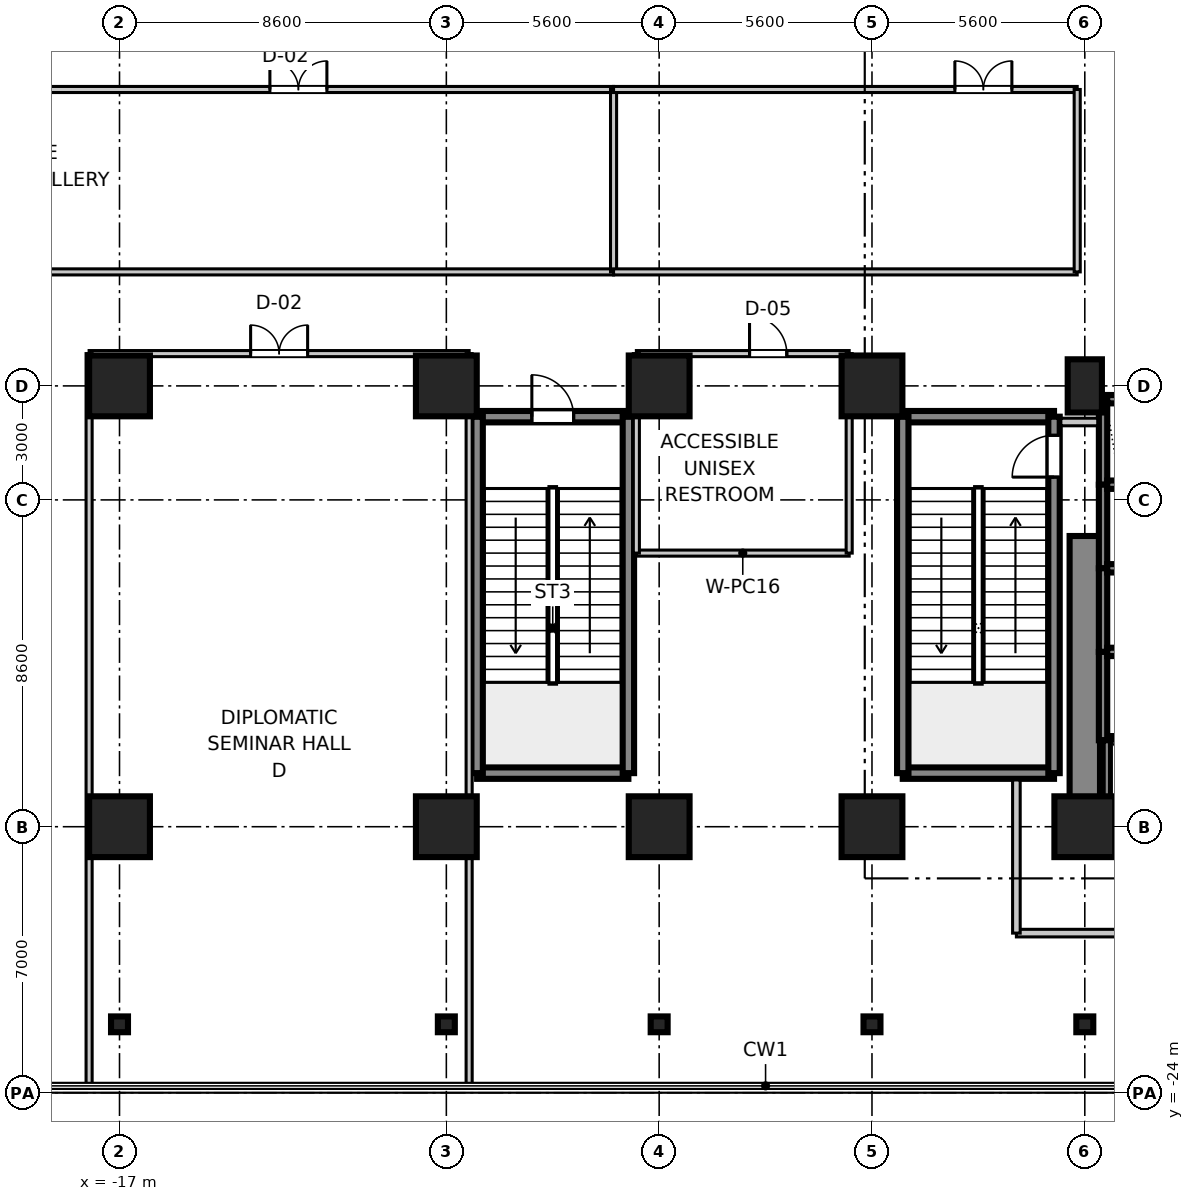
"""IFC4 building model, lengths in metres.
Left out: names, types, materials, properties, quantities, classifications, styles, units other than length and angle.
Written with IfcOpenShell. Run it as: python <this file> out.ifc"""

import sys

from ifc_helpers import new_model, si_unit, direction, frame, frame_2d, origin, origin_2d, place, context, subcontext, project, spatial, rectangle, i_section, extrude, source, transform, mapped, element, fill, save


model = new_model("IFC4")
c1 = context("Model", 3, precision=1e-05, world=origin(), true_north=direction((0.0, 1.0)))
c2 = subcontext(c1, "Body", "Model", "MODEL_VIEW")
j1 = project(units=[si_unit("LENGTHUNIT", "METRE"), si_unit("PLANEANGLEUNIT", "RADIAN")], contexts=[c1])
p1 = place(None, origin())
s1 = spatial("IfcSite", under=j1, at=p1, CompositionType="ELEMENT")
p2 = place(p1, origin())
s2 = spatial("IfcBuilding", under=s1, at=p2, CompositionType="ELEMENT")
p3 = place(p2, frame((0.0, 0.0, 10.8)))
s3 = spatial("IfcBuildingStorey", under=s2, at=p3, CompositionType="ELEMENT", Elevation=10.8)
m1 = source(origin(), c2, "Body", "SweptSolid", [
    extrude(rectangle(XDim=1.6, YDim=1.6, at=origin_2d()), origin(), (0.0, 0.0, 1.0), 5.355),
])
for number, where, z_axis, x_axis in (
    (1, (-17.0, -17.0, 0.0), (0.0, 0.0, 1.0), (1.0, 0.0, 0.0)),
    (2, (-17.0, -5.4, 0.0), (0.0, 0.0, 1.0), (1.0, 0.0, 0.0)),
    (3, (-8.4, -17.0, 0.0), (0.0, 0.0, 1.0), (1.0, 0.0, 0.0)),
    (4, (-8.4, -5.4, 0.0), (0.0, 0.0, 1.0), (1.0, 0.0, 0.0)),
    (5, (-2.8, -17.0, 0.0), (0.0, 0.0, 1.0), (1.0, 0.0, 0.0)),
    (6, (-2.8, -5.4, 0.0), (0.0, 0.0, 1.0), (1.0, 0.0, 0.0)),
    (7, (2.8, -17.0, 0.0), (0.0, 0.0, 1.0), (1.0, 0.0, 0.0)),
    (8, (2.8, -5.4, 0.0), (0.0, 0.0, 1.0), (1.0, 0.0, 0.0)),
    (9, (8.4, -17.0, 0.0), (0.0, 0.0, 1.0), (1.0, 0.0, 0.0)),
):
    element("IfcColumn", number, at=place(p3, frame(where, z_axis=z_axis, x_axis=x_axis)), inside=s3, PredefinedType="COLUMN", context=c2, shape_type="MappedRepresentation", body=[
        mapped(m1, transform((0.0, 0.0, 0.0), scale=1.0)),
    ])
m2 = source(origin(), c2, "Body", "SweptSolid", [
    extrude(rectangle(XDim=0.9, YDim=1.4, at=origin_2d()), origin(), (0.0, 0.0, 1.0), 5.355),
])
p4 = place(p3, frame((8.4, -5.4, 0.0), z_axis=(0.0, 0.0, 1.0), x_axis=(1.0, 0.0, 0.0)))
e10 = element("IfcColumn", 10, at=p4, inside=s3, PredefinedType="PILASTER", context=c2, shape_type="MappedRepresentation", body=[
    mapped(m2, transform((0.0, 0.0, 0.0), scale=1.0)),
])
m3 = source(origin(), c2, "Body", "SweptSolid", [
    extrude(i_section(OverallWidth=0.416, OverallDepth=0.446, WebThickness=0.025, FlangeThickness=0.04, at=origin_2d()), origin(), (0.0, 0.0, 1.0), 5.355),
])
for number, where, z_axis, x_axis in (
    (11, (-17.0, -22.2, 0.0), (0.0, 0.0, 1.0), (0.0, 1.0, 0.0)),
    (12, (-8.4, -22.2, 0.0), (0.0, 0.0, 1.0), (0.0, 1.0, 0.0)),
    (13, (-2.8, -22.2, 0.0), (0.0, 0.0, 1.0), (0.0, 1.0, 0.0)),
    (14, (2.8, -22.2, 0.0), (0.0, 0.0, 1.0), (0.0, 1.0, 0.0)),
    (15, (8.4, -22.2, 0.0), (0.0, 0.0, 1.0), (0.0, 1.0, 0.0)),
):
    element("IfcColumn", number, at=place(p3, frame(where, z_axis=z_axis, x_axis=x_axis)), inside=s3, PredefinedType="COLUMN", context=c2, shape_type="MappedRepresentation", body=[
        mapped(m3, transform((0.0, 0.0, 0.0), scale=1.0)),
    ])
m4 = source(origin(), c2, "Body", "SweptSolid", [
    extrude(rectangle(XDim=7.65, YDim=0.8, at=frame_2d((3.825, 0.0))), origin(), (0.0, 0.0, 1.0), 5.06),
])
p5 = place(p3, frame((8.4, -17.0, 0.0), z_axis=(0.0, 0.0, 1.0), x_axis=(0.0, 1.0, 0.0)))
e16 = element("IfcWall", 16, at=p5, inside=s3, PredefinedType="SHEAR", context=c2, shape_type="MappedRepresentation", body=[
    mapped(m4, transform((0.0, 0.0, 0.0), scale=1.0)),
])
m5 = source(origin(), c2, "Body", "SweptSolid", [
    extrude(rectangle(XDim=3.98, YDim=0.3, at=frame_2d((1.99, 0.0))), origin(), (0.0, 0.0, 1.0), 5.06),
])
for number, where, z_axis, x_axis in (
    (17, (3.61, -15.59, 0.0), (0.0, 0.0, 1.0), (1.0, 0.0, 0.0)),
    (18, (3.61, -6.21, 0.0), (0.0, 0.0, 1.0), (1.0, 0.0, 0.0)),
):
    element("IfcWall", number, at=place(p3, frame(where, z_axis=z_axis, x_axis=x_axis)), inside=s3, PredefinedType="SHEAR", context=c2, shape_type="MappedRepresentation", body=[
        mapped(m5, transform((0.0, 0.0, 0.0), scale=1.0)),
    ])
m6 = source(origin(), c2, "Body", "SweptSolid", [
    extrude(rectangle(XDim=9.38, YDim=0.3, at=frame_2d((4.69, 0.0))), origin(), (0.0, 0.0, 1.0), 5.06),
])
p6 = place(p3, frame((3.61, -15.59, 0.0), z_axis=(0.0, 0.0, 1.0), x_axis=(0.0, 1.0, 0.0)))
e19 = element("IfcWall", 19, at=p6, inside=s3, PredefinedType="SHEAR", context=c2, shape_type="MappedRepresentation", body=[
    mapped(m6, transform((0.0, 0.0, 0.0), scale=1.0)),
])
p7 = place(p3, frame((7.59, -15.59, 0.0), z_axis=(0.0, 0.0, 1.0), x_axis=(0.0, 1.0, 0.0)))
e20 = element("IfcWall", 20, at=p7, inside=s3, PredefinedType="SHEAR", context=c2, shape_type="MappedRepresentation", body=[
    mapped(m6, transform((0.0, 0.0, 0.0), scale=1.0)),
])
p8 = place(p7, frame((7.79, 0.0, 0.0)))
e21 = element("IfcOpeningElement", 21, at=p8, cuts=e20, PredefinedType="OPENING", context=c2, shape_type="SweptSolid", body=[
    extrude(rectangle(XDim=1.1, YDim=2.15, at=frame_2d((0.55, 1.075))), frame((0.0, 0.16, 0.0), z_axis=(0.0, -1.0, 0.0), x_axis=(1.0, 0.0, 0.0)), (0.0, 0.0, 1.0), 0.32),
])
p9 = place(p3, frame((-7.59, -15.59, 0.0), z_axis=(0.0, 0.0, 1.0), x_axis=(1.0, 0.0, 0.0)))
e22 = element("IfcWall", 22, at=p9, inside=s3, PredefinedType="SHEAR", context=c2, shape_type="MappedRepresentation", body=[
    mapped(m5, transform((0.0, 0.0, 0.0), scale=1.0)),
])
p10 = place(p3, frame((-7.59, -6.21, 0.0), z_axis=(0.0, 0.0, 1.0), x_axis=(1.0, 0.0, 0.0)))
e23 = element("IfcWall", 23, at=p10, inside=s3, PredefinedType="SHEAR", context=c2, shape_type="MappedRepresentation", body=[
    mapped(m5, transform((0.0, 0.0, 0.0), scale=1.0)),
])
p11 = place(p10, frame((1.44, 0.0, 0.0)))
e24 = element("IfcOpeningElement", 24, at=p11, cuts=e23, PredefinedType="OPENING", context=c2, shape_type="SweptSolid", body=[
    extrude(rectangle(XDim=1.1, YDim=2.15, at=frame_2d((0.55, 1.075))), frame((0.0, 0.16, 0.0), z_axis=(0.0, -1.0, 0.0), x_axis=(1.0, 0.0, 0.0)), (0.0, 0.0, 1.0), 0.32),
])
for number, where, z_axis, x_axis in (
    (25, (-7.59, -15.59, 0.0), (0.0, 0.0, 1.0), (0.0, 1.0, 0.0)),
    (26, (-3.61, -15.59, 0.0), (0.0, 0.0, 1.0), (0.0, 1.0, 0.0)),
):
    element("IfcWall", number, at=place(p3, frame(where, z_axis=z_axis, x_axis=x_axis)), inside=s3, PredefinedType="SHEAR", context=c2, shape_type="MappedRepresentation", body=[
        mapped(m6, transform((0.0, 0.0, 0.0), scale=1.0)),
    ])
m7 = source(origin(), c2, "Body", "SweptSolid", [
    extrude(rectangle(XDim=2.36, YDim=0.22, at=frame_2d((1.18, 0.0))), origin(), (0.0, 0.0, 1.0), 5.06),
])
p12 = place(p3, frame((8.88, -8.0, 0.0), z_axis=(0.0, 0.0, 1.0), x_axis=(0.0, 1.0, 0.0)))
e27 = element("IfcWall", 27, at=p12, inside=s3, PredefinedType="SHEAR", context=c2, shape_type="MappedRepresentation", body=[
    mapped(m7, transform((0.0, 0.0, 0.0), scale=1.0)),
])
m8 = source(origin(), c2, "Body", "SweptSolid", [
    extrude(rectangle(XDim=1.82, YDim=0.22, at=frame_2d((0.91, 0.0))), origin(), (0.0, 0.0, 1.0), 5.06),
])
p13 = place(p3, frame((8.99, -5.75, 0.0), z_axis=(0.0, 0.0, 1.0), x_axis=(1.0, 0.0, 0.0)))
e28 = element("IfcWall", 28, at=p13, inside=s3, PredefinedType="SHEAR", context=c2, shape_type="MappedRepresentation", body=[
    mapped(m8, transform((0.0, 0.0, 0.0), scale=1.0)),
])
m9 = source(origin(), c2, "Body", "SweptSolid", [
    extrude(rectangle(XDim=2.2, YDim=0.22, at=frame_2d((1.1, 0.0))), origin(), (0.0, 0.0, 1.0), 5.06),
])
p14 = place(p3, frame((8.88, -10.2, 0.0), z_axis=(0.0, 0.0, 1.0), x_axis=(0.0, 1.0, 0.0)))
e29 = element("IfcWall", 29, at=p14, inside=s3, PredefinedType="SHEAR", context=c2, shape_type="MappedRepresentation", body=[
    mapped(m9, transform((0.0, 0.0, 0.0), scale=1.0)),
])
m10 = source(origin(), c2, "Body", "SweptSolid", [
    extrude(rectangle(XDim=1.82, YDim=0.22, at=frame_2d((0.91, 0.0))), origin(), (0.0, 0.0, 1.0), 5.4),
])
p15 = place(p3, frame((8.99, -8.0, 0.0), z_axis=(0.0, 0.0, 1.0), x_axis=(1.0, 0.0, 0.0)))
e30 = element("IfcWall", 30, at=p15, inside=s3, PredefinedType="SHEAR", context=c2, shape_type="MappedRepresentation", body=[
    mapped(m10, transform((0.0, 0.0, 0.0), scale=1.0)),
])
p16 = place(p3, frame((8.88, -12.4, 0.0), z_axis=(0.0, 0.0, 1.0), x_axis=(0.0, 1.0, 0.0)))
e31 = element("IfcWall", 31, at=p16, inside=s3, PredefinedType="SHEAR", context=c2, shape_type="MappedRepresentation", body=[
    mapped(m9, transform((0.0, 0.0, 0.0), scale=1.0)),
])
p17 = place(p3, frame((8.99, -10.2, 0.0), z_axis=(0.0, 0.0, 1.0), x_axis=(1.0, 0.0, 0.0)))
e32 = element("IfcWall", 32, at=p17, inside=s3, PredefinedType="SHEAR", context=c2, shape_type="MappedRepresentation", body=[
    mapped(m10, transform((0.0, 0.0, 0.0), scale=1.0)),
])
m11 = source(origin(), c2, "Body", "SweptSolid", [
    extrude(rectangle(XDim=2.325, YDim=0.22, at=frame_2d((1.163, 0.0))), origin(), (0.0, 0.0, 1.0), 5.06),
])
p18 = place(p3, frame((8.88, -14.725, 0.0), z_axis=(0.0, 0.0, 1.0), x_axis=(0.0, 1.0, 0.0)))
e33 = element("IfcWall", 33, at=p18, inside=s3, PredefinedType="SHEAR", context=c2, shape_type="MappedRepresentation", body=[
    mapped(m11, transform((0.0, 0.0, 0.0), scale=1.0)),
])
p19 = place(p3, frame((8.99, -12.4, 0.0), z_axis=(0.0, 0.0, 1.0), x_axis=(1.0, 0.0, 0.0)))
e34 = element("IfcWall", 34, at=p19, inside=s3, PredefinedType="SHEAR", context=c2, shape_type="MappedRepresentation", body=[
    mapped(m10, transform((0.0, 0.0, 0.0), scale=1.0)),
])
m12 = source(origin(), c2, "Body", "SweptSolid", [
    extrude(rectangle(XDim=2.635, YDim=0.22, at=frame_2d((1.317, 0.0))), origin(), (0.0, 0.0, 1.0), 5.06),
])
p20 = place(p3, frame((8.98, -17.36, 0.0), z_axis=(0.0, 0.0, 1.0), x_axis=(0.0, 1.0, 0.0)))
e35 = element("IfcWall", 35, at=p20, inside=s3, PredefinedType="SHEAR", context=c2, shape_type="MappedRepresentation", body=[
    mapped(m12, transform((0.0, 0.0, 0.0), scale=1.0)),
])
m13 = source(origin(), c2, "Body", "SweptSolid", [
    extrude(rectangle(XDim=1.62, YDim=0.22, at=frame_2d((0.81, 0.0))), origin(), (0.0, 0.0, 1.0), 5.06),
])
p21 = place(p3, frame((9.09, -17.25, 0.0), z_axis=(0.0, 0.0, 1.0), x_axis=(1.0, 0.0, 0.0)))
e36 = element("IfcWall", 36, at=p21, inside=s3, PredefinedType="SHEAR", context=c2, shape_type="MappedRepresentation", body=[
    mapped(m13, transform((0.0, 0.0, 0.0), scale=1.0)),
])
m14 = source(origin(), c2, "Body", "SweptSolid", [
    extrude(rectangle(XDim=1.62, YDim=0.22, at=frame_2d((0.81, 0.0))), origin(), (0.0, 0.0, 1.0), 5.4),
])
p22 = place(p3, frame((9.09, -14.725, 0.0), z_axis=(0.0, 0.0, 1.0), x_axis=(1.0, 0.0, 0.0)))
e37 = element("IfcWall", 37, at=p22, inside=s3, PredefinedType="SHEAR", context=c2, shape_type="MappedRepresentation", body=[
    mapped(m14, transform((0.0, 0.0, 0.0), scale=1.0)),
])
m15 = source(origin(), c2, "Body", "SweptSolid", [
    extrude(rectangle(XDim=5.82, YDim=0.2, at=frame_2d((2.91, 0.0))), origin(), (0.0, 0.0, 1.0), 3.4),
])
p23 = place(p3, frame((6.6, -19.8, 0.0), z_axis=(0.0, 0.0, 1.0), x_axis=(1.0, 0.0, 0.0)))
e38 = element("IfcWall", 38, at=p23, inside=s3, PredefinedType="PARTITIONING", context=c2, shape_type="MappedRepresentation", body=[
    mapped(m15, transform((0.0, 0.0, 0.0), scale=1.0)),
])
m16 = source(origin(), c2, "Body", "SweptSolid", [
    extrude(rectangle(XDim=4.03, YDim=0.2, at=frame_2d((2.015, 0.0))), origin(), (0.0, 0.0, 1.0), 3.4),
])
p24 = place(p3, frame((6.6, -19.8, 0.0), z_axis=(0.0, 0.0, 1.0), x_axis=(0.0, 1.0, 0.0)))
e39 = element("IfcWall", 39, at=p24, inside=s3, PredefinedType="PARTITIONING", context=c2, shape_type="MappedRepresentation", body=[
    mapped(m16, transform((0.0, 0.0, 0.0), scale=1.0)),
])
m17 = source(origin(), c2, "Body", "SweptSolid", [
    extrude(rectangle(XDim=0.97, YDim=0.2, at=frame_2d((0.485, 0.0))), origin(), (0.0, 0.0, 1.0), 3.4),
])
p25 = place(p3, frame((7.77, -6.35, 0.0), z_axis=(0.0, 0.0, 1.0), x_axis=(1.0, 0.0, 0.0)))
e40 = element("IfcWall", 40, at=p25, inside=s3, PredefinedType="PARTITIONING", context=c2, shape_type="MappedRepresentation", body=[
    mapped(m17, transform((0.0, 0.0, 0.0), scale=1.0)),
])
m18 = source(origin(), c2, "Body", "SweptSolid", [
    extrude(rectangle(XDim=10.0, YDim=0.16, at=frame_2d((5.0, 0.0))), origin(), (0.0, 0.0, 1.0), 3.4),
])
p26 = place(p3, frame((-17.8, -4.55, 0.0), z_axis=(0.0, 0.0, 1.0), x_axis=(1.0, 0.0, 0.0)))
e41 = element("IfcWall", 41, at=p26, inside=s3, PredefinedType="PARTITIONING", context=c2, shape_type="MappedRepresentation", body=[
    mapped(m18, transform((0.0, 0.0, 0.0), scale=1.0)),
])
p27 = place(p26, frame((4.25, 0.0, 0.0)))
e42 = element("IfcOpeningElement", 42, at=p27, cuts=e41, PredefinedType="OPENING", context=c2, shape_type="SweptSolid", body=[
    extrude(rectangle(XDim=1.5, YDim=2.15, at=frame_2d((0.75, 1.075))), frame((0.0, 0.09, 0.0), z_axis=(0.0, -1.0, 0.0), x_axis=(1.0, 0.0, 0.0)), (0.0, 0.0, 1.0), 0.18),
])
m19 = source(origin(), c2, "Body", "SweptSolid", [
    extrude(rectangle(XDim=19.21, YDim=0.16, at=frame_2d((9.605, 0.0))), origin(), (0.0, 0.0, 1.0), 3.4),
])
for number, where, z_axis, x_axis in (
    (43, (-17.8, -23.76, 0.0), (0.0, 0.0, 1.0), (0.0, 1.0, 0.0)),
    (44, (-7.8, -23.76, 0.0), (0.0, 0.0, 1.0), (0.0, 1.0, 0.0)),
):
    element("IfcWall", number, at=place(p3, frame(where, z_axis=z_axis, x_axis=x_axis)), inside=s3, PredefinedType="PARTITIONING", context=c2, shape_type="MappedRepresentation", body=[
        mapped(m19, transform((0.0, 0.0, 0.0), scale=1.0)),
    ])
m20 = source(origin(), c2, "Body", "SweptSolid", [
    extrude(rectangle(XDim=32.76, YDim=0.16, at=frame_2d((16.38, 0.0))), origin(), (0.0, 0.0, 1.0), 3.4),
])
p28 = place(p3, frame((-36.76, -2.4, 0.0), z_axis=(0.0, 0.0, 1.0), x_axis=(1.0, 0.0, 0.0)))
e45 = element("IfcWall", 45, at=p28, inside=s3, PredefinedType="PARTITIONING", context=c2, shape_type="MappedRepresentation", body=[
    mapped(m20, transform((0.0, 0.0, 0.0), scale=1.0)),
])
p29 = place(p3, frame((-36.76, 2.4, 0.0), z_axis=(0.0, 0.0, 1.0), x_axis=(1.0, 0.0, 0.0)))
e46 = element("IfcWall", 46, at=p29, inside=s3, PredefinedType="PARTITIONING", context=c2, shape_type="MappedRepresentation", body=[
    mapped(m20, transform((0.0, 0.0, 0.0), scale=1.0)),
])
p30 = place(p29, frame((23.717, 0.0, 0.0)))
e47 = element("IfcOpeningElement", 47, at=p30, cuts=e46, PredefinedType="OPENING", context=c2, shape_type="SweptSolid", body=[
    extrude(rectangle(XDim=1.5, YDim=2.15, at=frame_2d((0.75, 1.075))), frame((0.0, 0.09, 0.0), z_axis=(0.0, -1.0, 0.0), x_axis=(1.0, 0.0, 0.0)), (0.0, 0.0, 1.0), 0.18),
])
m21 = source(origin(), c2, "Body", "SweptSolid", [
    extrude(rectangle(XDim=4.8, YDim=0.16, at=frame_2d((2.4, 0.0))), origin(), (0.0, 0.0, 1.0), 3.4),
])
p31 = place(p3, frame((-4.0, -2.4, 0.0), z_axis=(0.0, 0.0, 1.0), x_axis=(0.0, 1.0, 0.0)))
e48 = element("IfcWall", 48, at=p31, inside=s3, PredefinedType="PARTITIONING", context=c2, shape_type="MappedRepresentation", body=[
    mapped(m21, transform((0.0, 0.0, 0.0), scale=1.0)),
])
m22 = source(origin(), c2, "Body", "SweptSolid", [
    extrude(rectangle(XDim=12.2, YDim=0.16, at=frame_2d((6.1, 0.0))), origin(), (0.0, 0.0, 1.0), 3.4),
])
p32 = place(p3, frame((-4.0, -2.4, 0.0), z_axis=(0.0, 0.0, 1.0), x_axis=(1.0, 0.0, 0.0)))
e49 = element("IfcWall", 49, at=p32, inside=s3, PredefinedType="PARTITIONING", context=c2, shape_type="MappedRepresentation", body=[
    mapped(m22, transform((0.0, 0.0, 0.0), scale=1.0)),
])
p33 = place(p3, frame((-4.0, 2.4, 0.0), z_axis=(0.0, 0.0, 1.0), x_axis=(1.0, 0.0, 0.0)))
e50 = element("IfcWall", 50, at=p33, inside=s3, PredefinedType="PARTITIONING", context=c2, shape_type="MappedRepresentation", body=[
    mapped(m22, transform((0.0, 0.0, 0.0), scale=1.0)),
])
p34 = place(p33, frame((8.981, 0.0, 0.0)))
e51 = element("IfcOpeningElement", 51, at=p34, cuts=e50, PredefinedType="OPENING", context=c2, shape_type="SweptSolid", body=[
    extrude(rectangle(XDim=1.5, YDim=2.15, at=frame_2d((0.75, 1.075))), frame((0.0, 0.09, 0.0), z_axis=(0.0, -1.0, 0.0), x_axis=(1.0, 0.0, 0.0)), (0.0, 0.0, 1.0), 0.18),
])
p35 = place(p3, frame((8.2, -2.4, 0.0), z_axis=(0.0, 0.0, 1.0), x_axis=(0.0, 1.0, 0.0)))
e52 = element("IfcWall", 52, at=p35, inside=s3, PredefinedType="PARTITIONING", context=c2, shape_type="MappedRepresentation", body=[
    mapped(m21, transform((0.0, 0.0, 0.0), scale=1.0)),
])
m23 = source(origin(), c2, "Body", "SweptSolid", [
    extrude(rectangle(XDim=5.6, YDim=0.16, at=frame_2d((2.8, 0.0))), origin(), (0.0, 0.0, 1.0), 3.4),
])
p36 = place(p3, frame((-3.4, -9.8, 0.0), z_axis=(0.0, 0.0, 1.0), x_axis=(1.0, 0.0, 0.0)))
e53 = element("IfcWall", 53, at=p36, inside=s3, PredefinedType="PARTITIONING", context=c2, shape_type="MappedRepresentation", body=[
    mapped(m23, transform((0.0, 0.0, 0.0), scale=1.0)),
])
p37 = place(p3, frame((-3.4, -4.55, 0.0), z_axis=(0.0, 0.0, 1.0), x_axis=(1.0, 0.0, 0.0)))
e54 = element("IfcWall", 54, at=p37, inside=s3, PredefinedType="PARTITIONING", context=c2, shape_type="MappedRepresentation", body=[
    mapped(m23, transform((0.0, 0.0, 0.0), scale=1.0)),
])
p38 = place(p37, frame((2.978, 0.0, 0.0)))
e55 = element("IfcOpeningElement", 55, at=p38, cuts=e54, PredefinedType="OPENING", context=c2, shape_type="SweptSolid", body=[
    extrude(rectangle(XDim=0.98, YDim=2.1, at=frame_2d((0.49, 1.05))), frame((0.0, 0.09, 0.0), z_axis=(0.0, -1.0, 0.0), x_axis=(1.0, 0.0, 0.0)), (0.0, 0.0, 1.0), 0.18),
])
m24 = source(origin(), c2, "Body", "SweptSolid", [
    extrude(rectangle(XDim=5.25, YDim=0.16, at=frame_2d((2.625, 0.0))), origin(), (0.0, 0.0, 1.0), 3.4),
])
for number, where, z_axis, x_axis in (
    (56, (-3.4, -9.8, 0.0), (0.0, 0.0, 1.0), (0.0, 1.0, 0.0)),
    (57, (2.2, -9.8, 0.0), (0.0, 0.0, 1.0), (0.0, 1.0, 0.0)),
):
    element("IfcWall", number, at=place(p3, frame(where, z_axis=z_axis, x_axis=x_axis)), inside=s3, PredefinedType="PARTITIONING", context=c2, shape_type="MappedRepresentation", body=[
        mapped(m24, transform((0.0, 0.0, 0.0), scale=1.0)),
    ])
m25 = source(origin(), c2, "Body", "SweptSolid", [
    extrude(rectangle(XDim=1.1, YDim=2.15, at=frame_2d((0.55, 1.075))), frame((0.0, 0.025, 0.0), z_axis=(0.0, -1.0, 0.0), x_axis=(1.0, 0.0, 0.0)), (0.0, 0.0, 1.0), 0.05),
])
p39 = place(p8, origin())
e58 = element("IfcDoor", 58, at=p39, inside=s3, OperationType="SINGLE_SWING_LEFT", PredefinedType="DOOR", context=c2, shape_type="MappedRepresentation", body=[
    mapped(m25, transform((0.0, 0.0, 0.0), scale=1.0)),
])
fill(e21, e58)
p40 = place(p11, frame((1.1, 0.0, 0.0), z_axis=(0.0, 0.0, 1.0), x_axis=(-1.0, 0.0, 0.0)))
e59 = element("IfcDoor", 59, at=p40, inside=s3, OperationType="SINGLE_SWING_LEFT", PredefinedType="DOOR", context=c2, shape_type="MappedRepresentation", body=[
    mapped(m25, transform((0.0, 0.0, 0.0), scale=1.0)),
])
fill(e24, e59)
m26 = source(origin(), c2, "Body", "SweptSolid", [
    extrude(rectangle(XDim=1.5, YDim=2.15, at=frame_2d((0.75, 1.075))), frame((0.0, 0.025, 0.0), z_axis=(0.0, -1.0, 0.0), x_axis=(1.0, 0.0, 0.0)), (0.0, 0.0, 1.0), 0.05),
])
p41 = place(p27, frame((1.5, 0.0, 0.0), z_axis=(0.0, 0.0, 1.0), x_axis=(-1.0, 0.0, 0.0)))
e60 = element("IfcDoor", 60, at=p41, inside=s3, OperationType="DOUBLE_DOOR_SINGLE_SWING", PredefinedType="DOOR", context=c2, shape_type="MappedRepresentation", body=[
    mapped(m26, transform((0.0, 0.0, 0.0), scale=1.0)),
])
fill(e42, e60)
p42 = place(p30, frame((1.5, 0.0, 0.0), z_axis=(0.0, 0.0, 1.0), x_axis=(-1.0, 0.0, 0.0)))
e61 = element("IfcDoor", 61, at=p42, inside=s3, OperationType="DOUBLE_DOOR_SINGLE_SWING", PredefinedType="DOOR", context=c2, shape_type="MappedRepresentation", body=[
    mapped(m26, transform((0.0, 0.0, 0.0), scale=1.0)),
])
fill(e47, e61)
p43 = place(p34, frame((1.5, 0.0, 0.0), z_axis=(0.0, 0.0, 1.0), x_axis=(-1.0, 0.0, 0.0)))
e62 = element("IfcDoor", 62, at=p43, inside=s3, OperationType="DOUBLE_DOOR_SINGLE_SWING", PredefinedType="DOOR", context=c2, shape_type="MappedRepresentation", body=[
    mapped(m26, transform((0.0, 0.0, 0.0), scale=1.0)),
])
fill(e51, e62)
m27 = source(origin(), c2, "Body", "SweptSolid", [
    extrude(rectangle(XDim=0.98, YDim=2.1, at=frame_2d((0.49, 1.05))), frame((0.0, 0.025, 0.0), z_axis=(0.0, -1.0, 0.0), x_axis=(1.0, 0.0, 0.0)), (0.0, 0.0, 1.0), 0.05),
])
p44 = place(p38, frame((0.98, 0.0, 0.0), z_axis=(0.0, 0.0, 1.0), x_axis=(-1.0, 0.0, 0.0)))
e63 = element("IfcDoor", 63, at=p44, inside=s3, OperationType="SINGLE_SWING_LEFT", PredefinedType="DOOR", context=c2, shape_type="MappedRepresentation", body=[
    mapped(m27, transform((0.0, 0.0, 0.0), scale=1.0)),
])
fill(e55, e63)
save(model, sys.argv[1])
